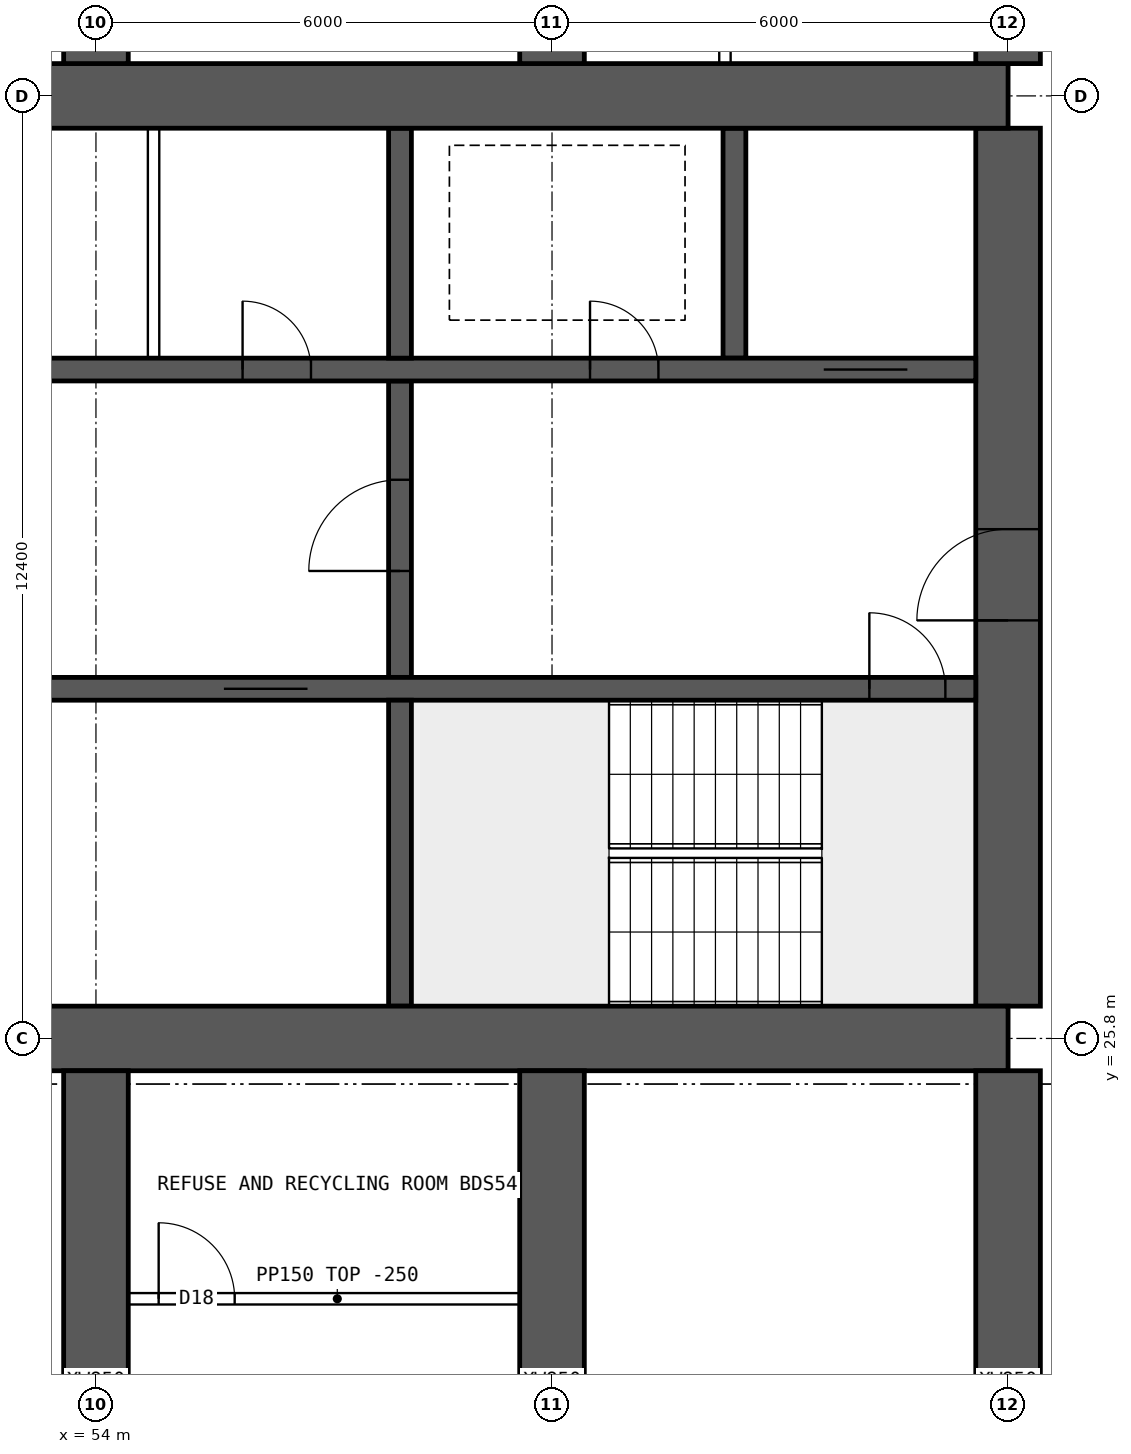
"""IFC4 building model, lengths in metres.
Left out: names, types, materials, properties, quantities, classifications, styles, units other than length and angle.
Written with IfcOpenShell. Run it as: python <this file> out.ifc"""

import sys

from ifc_helpers import new_model, si_unit, direction, frame, frame_2d, origin, place, context, subcontext, project, spatial, rectangle, extrude, element, fill, save


model = new_model("IFC4")
c1 = context("Model", 3, precision=1e-05, world=origin(), true_north=direction((0.0, 1.0)))
c2 = subcontext(c1, "Body", "Model", "MODEL_VIEW")
j1 = project(units=[si_unit("LENGTHUNIT", "METRE"), si_unit("PLANEANGLEUNIT", "RADIAN")], contexts=[c1])
p1 = place(None, origin())
s1 = spatial("IfcSite", under=j1, at=p1, CompositionType="ELEMENT")
p2 = place(p1, origin())
s2 = spatial("IfcBuilding", under=s1, at=p2, CompositionType="ELEMENT")
p3 = place(p2, frame((0.0, 0.0, 167.35)))
s3 = spatial("IfcBuildingStorey", under=s2, at=p3, CompositionType="ELEMENT", Elevation=167.35)
for number, where, z_axis, x_axis in (
    (1, (18.0, 25.8, 0.0), (0.0, 0.0, 1.0), (1.0, 0.0, 0.0)),
    (2, (18.0, 38.2, 0.0), (0.0, 0.0, 1.0), (1.0, 0.0, 0.0)),
):
    element("IfcWall", number, at=place(p3, frame(where, z_axis=z_axis, x_axis=x_axis)), inside=s3, PredefinedType="SHEAR", context=c2, shape_type="SweptSolid", body=[
        extrude(rectangle(XDim=48.0, YDim=0.85, at=frame_2d((24.0, 0.0))), origin(), (0.0, 0.0, 1.0), 3.75),
    ])
p4 = place(p3, frame((66.0, 26.225, 0.0), z_axis=(0.0, 0.0, 1.0), x_axis=(0.0, 1.0, 0.0)))
e3 = element("IfcWall", 3, at=p4, inside=s3, PredefinedType="SHEAR", context=c2, shape_type="SweptSolid", body=[
    extrude(rectangle(XDim=11.55, YDim=0.85, at=frame_2d((5.775, 0.0))), origin(), (0.0, 0.0, 1.0), 3.75),
])
p5 = place(p4, frame((5.075, 0.0, 0.0)))
e4 = element("IfcOpeningElement", 4, at=p5, cuts=e3, PredefinedType="OPENING", context=c2, shape_type="SweptSolid", body=[
    extrude(rectangle(XDim=1.2, YDim=2.1, at=frame_2d((0.6, 1.05))), frame((0.0, 0.435, 0.0), z_axis=(0.0, -1.0, 0.0), x_axis=(1.0, 0.0, 0.0)), (0.0, 0.0, 1.0), 0.87),
])
p6 = place(p3, frame((18.425, 30.4, 0.0), z_axis=(0.0, 0.0, 1.0), x_axis=(1.0, 0.0, 0.0)))
e5 = element("IfcWall", 5, at=p6, inside=s3, PredefinedType="SHEAR", context=c2, shape_type="SweptSolid", body=[
    extrude(rectangle(XDim=47.15, YDim=0.3, at=frame_2d((23.575, 0.0))), origin(), (0.0, 0.0, 1.0), 3.75),
])
p7 = place(p6, frame((0.4, 0.0, 0.0)))
e6 = element("IfcOpeningElement", 6, at=p7, cuts=e5, PredefinedType="OPENING", context=c2, shape_type="SweptSolid", body=[
    extrude(rectangle(XDim=1.0, YDim=2.1, at=frame_2d((0.5, 1.05))), frame((0.0, 0.16, 0.0), z_axis=(0.0, -1.0, 0.0), x_axis=(1.0, 0.0, 0.0)), (0.0, 0.0, 1.0), 0.32),
])
p8 = place(p6, frame((45.75, 0.0, 0.0)))
e7 = element("IfcOpeningElement", 7, at=p8, cuts=e5, PredefinedType="OPENING", context=c2, shape_type="SweptSolid", body=[
    extrude(rectangle(XDim=1.0, YDim=2.1, at=frame_2d((0.5, 1.05))), frame((0.0, 0.16, 0.0), z_axis=(0.0, -1.0, 0.0), x_axis=(1.0, 0.0, 0.0)), (0.0, 0.0, 1.0), 0.32),
])
p9 = place(p6, frame((8.325, 0.0, 0.0)))
e8 = element("IfcOpeningElement", 8, at=p9, cuts=e5, PredefinedType="OPENING", context=c2, shape_type="SweptSolid", body=[
    extrude(rectangle(XDim=1.1, YDim=2.1, at=frame_2d((0.55, 1.05))), frame((0.0, 0.16, 0.0), z_axis=(0.0, -1.0, 0.0), x_axis=(1.0, 0.0, 0.0)), (0.0, 0.0, 1.0), 0.32),
])
p10 = place(p6, frame((10.925, 0.0, 0.0)))
e9 = element("IfcOpeningElement", 9, at=p10, cuts=e5, PredefinedType="OPENING", context=c2, shape_type="SweptSolid", body=[
    extrude(rectangle(XDim=1.1, YDim=2.1, at=frame_2d((0.55, 1.05))), frame((0.0, 0.16, 0.0), z_axis=(0.0, -1.0, 0.0), x_axis=(1.0, 0.0, 0.0)), (0.0, 0.0, 1.0), 0.32),
])
p11 = place(p6, frame((13.525, 0.0, 0.0)))
e10 = element("IfcOpeningElement", 10, at=p11, cuts=e5, PredefinedType="OPENING", context=c2, shape_type="SweptSolid", body=[
    extrude(rectangle(XDim=1.1, YDim=2.1, at=frame_2d((0.55, 1.05))), frame((0.0, 0.16, 0.0), z_axis=(0.0, -1.0, 0.0), x_axis=(1.0, 0.0, 0.0)), (0.0, 0.0, 1.0), 0.32),
])
p12 = place(p6, frame((16.125, 0.0, 0.0)))
e11 = element("IfcOpeningElement", 11, at=p12, cuts=e5, PredefinedType="OPENING", context=c2, shape_type="SweptSolid", body=[
    extrude(rectangle(XDim=1.1, YDim=2.1, at=frame_2d((0.55, 1.05))), frame((0.0, 0.16, 0.0), z_axis=(0.0, -1.0, 0.0), x_axis=(1.0, 0.0, 0.0)), (0.0, 0.0, 1.0), 0.32),
])
p13 = place(p6, frame((18.9, 0.0, 0.0)))
e12 = element("IfcOpeningElement", 12, at=p13, cuts=e5, PredefinedType="OPENING", context=c2, shape_type="SweptSolid", body=[
    extrude(rectangle(XDim=0.9, YDim=2.1, at=frame_2d((0.45, 1.05))), frame((0.0, 0.16, 0.0), z_axis=(0.0, -1.0, 0.0), x_axis=(1.0, 0.0, 0.0)), (0.0, 0.0, 1.0), 0.32),
])
p14 = place(p6, frame((30.192, 0.0, 0.0)))
e13 = element("IfcOpeningElement", 13, at=p14, cuts=e5, PredefinedType="OPENING", context=c2, shape_type="SweptSolid", body=[
    extrude(rectangle(XDim=1.1, YDim=2.1, at=frame_2d((0.55, 1.05))), frame((0.0, 0.16, 0.0), z_axis=(0.0, -1.0, 0.0), x_axis=(1.0, 0.0, 0.0)), (0.0, 0.0, 1.0), 0.32),
])
p15 = place(p6, frame((33.725, 0.0, 0.0)))
e14 = element("IfcOpeningElement", 14, at=p15, cuts=e5, PredefinedType="OPENING", context=c2, shape_type="SweptSolid", body=[
    extrude(rectangle(XDim=1.1, YDim=2.1, at=frame_2d((0.55, 1.05))), frame((0.0, 0.16, 0.0), z_axis=(0.0, -1.0, 0.0), x_axis=(1.0, 0.0, 0.0)), (0.0, 0.0, 1.0), 0.32),
])
p16 = place(p6, frame((37.258, 0.0, 0.0)))
e15 = element("IfcOpeningElement", 15, at=p16, cuts=e5, PredefinedType="OPENING", context=c2, shape_type="SweptSolid", body=[
    extrude(rectangle(XDim=1.1, YDim=2.1, at=frame_2d((0.55, 1.05))), frame((0.0, 0.16, 0.0), z_axis=(0.0, -1.0, 0.0), x_axis=(1.0, 0.0, 0.0)), (0.0, 0.0, 1.0), 0.32),
])
p17 = place(p3, frame((18.425, 34.6, 0.0), z_axis=(0.0, 0.0, 1.0), x_axis=(1.0, 0.0, 0.0)))
e16 = element("IfcWall", 16, at=p17, inside=s3, PredefinedType="SHEAR", context=c2, shape_type="SweptSolid", body=[
    extrude(rectangle(XDim=47.15, YDim=0.3, at=frame_2d((23.575, 0.0))), origin(), (0.0, 0.0, 1.0), 3.75),
])
p18 = place(p17, frame((0.9, 0.0, 0.0)))
e17 = element("IfcOpeningElement", 17, at=p18, cuts=e16, PredefinedType="OPENING", context=c2, shape_type="SweptSolid", body=[
    extrude(rectangle(XDim=1.1, YDim=2.1, at=frame_2d((0.55, 1.05))), frame((0.0, 0.16, 0.0), z_axis=(0.0, -1.0, 0.0), x_axis=(1.0, 0.0, 0.0)), (0.0, 0.0, 1.0), 0.32),
])
p19 = place(p17, frame((45.15, 0.0, 0.0)))
e18 = element("IfcOpeningElement", 18, at=p19, cuts=e16, PredefinedType="OPENING", context=c2, shape_type="SweptSolid", body=[
    extrude(rectangle(XDim=1.1, YDim=2.1, at=frame_2d((0.55, 1.05))), frame((0.0, 0.16, 0.0), z_axis=(0.0, -1.0, 0.0), x_axis=(1.0, 0.0, 0.0)), (0.0, 0.0, 1.0), 0.32),
])
p20 = place(p17, frame((4.175, 0.0, 0.0)))
e19 = element("IfcOpeningElement", 19, at=p20, cuts=e16, PredefinedType="OPENING", context=c2, shape_type="SweptSolid", body=[
    extrude(rectangle(XDim=0.9, YDim=2.1, at=frame_2d((0.45, 1.05))), frame((0.0, 0.16, 0.0), z_axis=(0.0, -1.0, 0.0), x_axis=(1.0, 0.0, 0.0)), (0.0, 0.0, 1.0), 0.32),
])
p21 = place(p17, frame((42.075, 0.0, 0.0)))
e20 = element("IfcOpeningElement", 20, at=p21, cuts=e16, PredefinedType="OPENING", context=c2, shape_type="SweptSolid", body=[
    extrude(rectangle(XDim=0.9, YDim=2.1, at=frame_2d((0.45, 1.05))), frame((0.0, 0.16, 0.0), z_axis=(0.0, -1.0, 0.0), x_axis=(1.0, 0.0, 0.0)), (0.0, 0.0, 1.0), 0.32),
])
p22 = place(p17, frame((8.95, 0.0, 0.0)))
e21 = element("IfcOpeningElement", 21, at=p22, cuts=e16, PredefinedType="OPENING", context=c2, shape_type="SweptSolid", body=[
    extrude(rectangle(XDim=0.9, YDim=2.1, at=frame_2d((0.45, 1.05))), frame((0.0, 0.16, 0.0), z_axis=(0.0, -1.0, 0.0), x_axis=(1.0, 0.0, 0.0)), (0.0, 0.0, 1.0), 0.32),
])
p23 = place(p17, frame((12.924, 0.0, 0.0)))
e22 = element("IfcOpeningElement", 22, at=p23, cuts=e16, PredefinedType="OPENING", context=c2, shape_type="SweptSolid", body=[
    extrude(rectangle(XDim=0.9, YDim=2.1, at=frame_2d((0.45, 1.05))), frame((0.0, 0.16, 0.0), z_axis=(0.0, -1.0, 0.0), x_axis=(1.0, 0.0, 0.0)), (0.0, 0.0, 1.0), 0.32),
])
p24 = place(p17, frame((16.571, 0.0, 0.0)))
e23 = element("IfcOpeningElement", 23, at=p24, cuts=e16, PredefinedType="OPENING", context=c2, shape_type="SweptSolid", body=[
    extrude(rectangle(XDim=0.9, YDim=2.1, at=frame_2d((0.45, 1.05))), frame((0.0, 0.16, 0.0), z_axis=(0.0, -1.0, 0.0), x_axis=(1.0, 0.0, 0.0)), (0.0, 0.0, 1.0), 0.32),
])
p25 = place(p17, frame((20.33, 0.0, 0.0)))
e24 = element("IfcOpeningElement", 24, at=p25, cuts=e16, PredefinedType="OPENING", context=c2, shape_type="SweptSolid", body=[
    extrude(rectangle(XDim=0.9, YDim=2.1, at=frame_2d((0.45, 1.05))), frame((0.0, 0.16, 0.0), z_axis=(0.0, -1.0, 0.0), x_axis=(1.0, 0.0, 0.0)), (0.0, 0.0, 1.0), 0.32),
])
p26 = place(p17, frame((24.736, 0.0, 0.0)))
e25 = element("IfcOpeningElement", 25, at=p26, cuts=e16, PredefinedType="OPENING", context=c2, shape_type="SweptSolid", body=[
    extrude(rectangle(XDim=0.9, YDim=2.1, at=frame_2d((0.45, 1.05))), frame((0.0, 0.16, 0.0), z_axis=(0.0, -1.0, 0.0), x_axis=(1.0, 0.0, 0.0)), (0.0, 0.0, 1.0), 0.32),
])
p27 = place(p17, frame((27.533, 0.0, 0.0)))
e26 = element("IfcOpeningElement", 26, at=p27, cuts=e16, PredefinedType="OPENING", context=c2, shape_type="SweptSolid", body=[
    extrude(rectangle(XDim=0.9, YDim=2.1, at=frame_2d((0.45, 1.05))), frame((0.0, 0.16, 0.0), z_axis=(0.0, -1.0, 0.0), x_axis=(1.0, 0.0, 0.0)), (0.0, 0.0, 1.0), 0.32),
])
p28 = place(p17, frame((29.906, 0.0, 0.0)))
e27 = element("IfcOpeningElement", 27, at=p28, cuts=e16, PredefinedType="OPENING", context=c2, shape_type="SweptSolid", body=[
    extrude(rectangle(XDim=0.9, YDim=2.1, at=frame_2d((0.45, 1.05))), frame((0.0, 0.16, 0.0), z_axis=(0.0, -1.0, 0.0), x_axis=(1.0, 0.0, 0.0)), (0.0, 0.0, 1.0), 0.32),
])
p29 = place(p17, frame((33.756, 0.0, 0.0)))
e28 = element("IfcOpeningElement", 28, at=p29, cuts=e16, PredefinedType="OPENING", context=c2, shape_type="SweptSolid", body=[
    extrude(rectangle(XDim=0.9, YDim=2.1, at=frame_2d((0.45, 1.05))), frame((0.0, 0.16, 0.0), z_axis=(0.0, -1.0, 0.0), x_axis=(1.0, 0.0, 0.0)), (0.0, 0.0, 1.0), 0.32),
])
p30 = place(p17, frame((37.504, 0.0, 0.0)))
e29 = element("IfcOpeningElement", 29, at=p30, cuts=e16, PredefinedType="OPENING", context=c2, shape_type="SweptSolid", body=[
    extrude(rectangle(XDim=0.9, YDim=2.1, at=frame_2d((0.45, 1.05))), frame((0.0, 0.16, 0.0), z_axis=(0.0, -1.0, 0.0), x_axis=(1.0, 0.0, 0.0)), (0.0, 0.0, 1.0), 0.32),
])
p31 = place(p3, frame((58.0, 26.225, 0.0), z_axis=(0.0, 0.0, 1.0), x_axis=(0.0, 1.0, 0.0)))
e30 = element("IfcWall", 30, at=p31, inside=s3, PredefinedType="SHEAR", context=c2, shape_type="SweptSolid", body=[
    extrude(rectangle(XDim=4.025, YDim=0.3, at=frame_2d((2.012, 0.0))), origin(), (0.0, 0.0, 1.0), 3.75),
])
p32 = place(p3, frame((58.0, 30.55, 0.0), z_axis=(0.0, 0.0, 1.0), x_axis=(0.0, 1.0, 0.0)))
e31 = element("IfcWall", 31, at=p32, inside=s3, PredefinedType="SHEAR", context=c2, shape_type="SweptSolid", body=[
    extrude(rectangle(XDim=3.9, YDim=0.3, at=frame_2d((1.95, 0.0))), origin(), (0.0, 0.0, 1.0), 3.75),
])
p33 = place(p32, frame((1.4, 0.0, 0.0)))
e32 = element("IfcOpeningElement", 32, at=p33, cuts=e31, PredefinedType="OPENING", context=c2, shape_type="SweptSolid", body=[
    extrude(rectangle(XDim=1.2, YDim=2.1, at=frame_2d((0.6, 1.05))), frame((0.0, 0.16, 0.0), z_axis=(0.0, -1.0, 0.0), x_axis=(1.0, 0.0, 0.0)), (0.0, 0.0, 1.0), 0.32),
])
for number, where, z_axis, x_axis in (
    (33, (62.4, 34.75, 0.0), (0.0, 0.0, 1.0), (0.0, 1.0, 0.0)),
    (34, (58.0, 34.75, 0.0), (0.0, 0.0, 1.0), (0.0, 1.0, 0.0)),
):
    element("IfcWall", number, at=place(p3, frame(where, z_axis=z_axis, x_axis=x_axis)), inside=s3, PredefinedType="SHEAR", context=c2, shape_type="SweptSolid", body=[
        extrude(rectangle(XDim=3.025, YDim=0.3, at=frame_2d((1.512, 0.0))), origin(), (0.0, 0.0, 1.0), 3.75),
    ])
for number, where, z_axis, x_axis in (
    (35, (54.0, 17.2, 0.0), (0.0, 0.0, 1.0), (0.0, 1.0, 0.0)),
    (36, (54.0, 38.625, 0.0), (0.0, 0.0, 1.0), (0.0, 1.0, 0.0)),
    (37, (60.0, 17.2, 0.0), (0.0, 0.0, 1.0), (0.0, 1.0, 0.0)),
    (38, (60.0, 38.625, 0.0), (0.0, 0.0, 1.0), (0.0, 1.0, 0.0)),
    (39, (66.0, 17.2, 0.0), (0.0, 0.0, 1.0), (0.0, 1.0, 0.0)),
    (40, (66.0, 38.625, 0.0), (0.0, 0.0, 1.0), (0.0, 1.0, 0.0)),
):
    element("IfcWall", number, at=place(p3, frame(where, z_axis=z_axis, x_axis=x_axis)), inside=s3, PredefinedType="SHEAR", context=c2, shape_type="SweptSolid", body=[
        extrude(rectangle(XDim=8.175, YDim=0.85, at=frame_2d((4.087, 0.0))), origin(), (0.0, 0.0, 1.0), 3.75),
    ])
p34 = place(p3, frame((54.758, 34.75, 0.0), z_axis=(0.0, 0.0, 1.0), x_axis=(0.0, 1.0, 0.0)))
e41 = element("IfcWall", 41, at=p34, inside=s3, PredefinedType="SOLIDWALL", context=c2, shape_type="SweptSolid", body=[
    extrude(rectangle(XDim=3.025, YDim=0.15, at=frame_2d((1.512, 0.0))), origin(), (0.0, 0.0, 1.0), 3.5),
])
p35 = place(p3, frame((54.425, 22.375, 0.0), z_axis=(0.0, 0.0, 1.0), x_axis=(1.0, 0.0, 0.0)))
e42 = element("IfcWall", 42, at=p35, inside=s3, PredefinedType="PARTITIONING", context=c2, shape_type="SweptSolid", body=[
    extrude(rectangle(XDim=5.5, YDim=0.15, at=frame_2d((2.75, 0.0))), origin(), (0.0, 0.0, 1.0), 3.5),
])
p36 = place(p35, frame((0.4, 0.0, 0.0)))
e43 = element("IfcOpeningElement", 43, at=p36, cuts=e42, PredefinedType="OPENING", context=c2, shape_type="SweptSolid", body=[
    extrude(rectangle(XDim=1.0, YDim=2.1, at=frame_2d((0.5, 1.05))), frame((0.0, 0.085, 0.0), z_axis=(0.0, -1.0, 0.0), x_axis=(1.0, 0.0, 0.0)), (0.0, 0.0, 1.0), 0.17),
])
p37 = place(p3, frame((62.275, 40.925, 0.0), z_axis=(0.0, 0.0, 1.0), x_axis=(0.0, -1.0, 0.0)))
e44 = element("IfcWall", 44, at=p37, inside=s3, PredefinedType="PARTITIONING", context=c2, shape_type="SweptSolid", body=[
    extrude(rectangle(XDim=2.3, YDim=0.15, at=frame_2d((1.15, 0.0))), origin(), (0.0, 0.0, 1.0), 3.5),
])
p38 = place(p5, origin())
e45 = element("IfcDoor", 45, at=p38, inside=s3, OperationType="SINGLE_SWING_LEFT", PredefinedType="DOOR", context=c2, shape_type="SweptSolid", body=[
    extrude(rectangle(XDim=1.2, YDim=2.1, at=frame_2d((0.6, 1.05))), frame((0.0, 0.025, 0.0), z_axis=(0.0, -1.0, 0.0), x_axis=(1.0, 0.0, 0.0)), (0.0, 0.0, 1.0), 0.05),
])
fill(e4, e45)
p39 = place(p8, origin())
e46 = element("IfcDoor", 46, at=p39, inside=s3, OperationType="SINGLE_SWING_LEFT", PredefinedType="DOOR", context=c2, shape_type="SweptSolid", body=[
    extrude(rectangle(XDim=1.0, YDim=2.1, at=frame_2d((0.5, 1.05))), frame((0.0, 0.025, 0.0), z_axis=(0.0, -1.0, 0.0), x_axis=(1.0, 0.0, 0.0)), (0.0, 0.0, 1.0), 0.05),
])
fill(e7, e46)
p40 = place(p19, origin())
e47 = element("IfcDoor", 47, at=p40, inside=s3, OperationType="DOUBLE_DOOR_SLIDING", PredefinedType="DOOR", context=c2, shape_type="SweptSolid", body=[
    extrude(rectangle(XDim=1.1, YDim=2.1, at=frame_2d((0.55, 1.05))), frame((0.0, 0.025, 0.0), z_axis=(0.0, -1.0, 0.0), x_axis=(1.0, 0.0, 0.0)), (0.0, 0.0, 1.0), 0.05),
])
fill(e18, e47)
p41 = place(p21, origin())
e48 = element("IfcDoor", 48, at=p41, inside=s3, OperationType="SINGLE_SWING_LEFT", PredefinedType="DOOR", context=c2, shape_type="SweptSolid", body=[
    extrude(rectangle(XDim=0.9, YDim=2.1, at=frame_2d((0.45, 1.05))), frame((0.0, 0.025, 0.0), z_axis=(0.0, -1.0, 0.0), x_axis=(1.0, 0.0, 0.0)), (0.0, 0.0, 1.0), 0.05),
])
fill(e20, e48)
p42 = place(p33, origin())
e49 = element("IfcDoor", 49, at=p42, inside=s3, OperationType="SINGLE_SWING_LEFT", PredefinedType="DOOR", context=c2, shape_type="SweptSolid", body=[
    extrude(rectangle(XDim=1.2, YDim=2.1, at=frame_2d((0.6, 1.05))), frame((0.0, 0.025, 0.0), z_axis=(0.0, -1.0, 0.0), x_axis=(1.0, 0.0, 0.0)), (0.0, 0.0, 1.0), 0.05),
])
fill(e32, e49)
p43 = place(p30, origin())
e50 = element("IfcDoor", 50, at=p43, inside=s3, OperationType="SINGLE_SWING_LEFT", PredefinedType="DOOR", context=c2, shape_type="SweptSolid", body=[
    extrude(rectangle(XDim=0.9, YDim=2.1, at=frame_2d((0.45, 1.05))), frame((0.0, 0.025, 0.0), z_axis=(0.0, -1.0, 0.0), x_axis=(1.0, 0.0, 0.0)), (0.0, 0.0, 1.0), 0.05),
])
fill(e29, e50)
p44 = place(p16, origin())
e51 = element("IfcDoor", 51, at=p44, inside=s3, OperationType="DOUBLE_DOOR_SLIDING", PredefinedType="DOOR", context=c2, shape_type="SweptSolid", body=[
    extrude(rectangle(XDim=1.1, YDim=2.1, at=frame_2d((0.55, 1.05))), frame((0.0, 0.025, 0.0), z_axis=(0.0, -1.0, 0.0), x_axis=(1.0, 0.0, 0.0)), (0.0, 0.0, 1.0), 0.05),
])
fill(e15, e51)
p45 = place(p36, origin())
e52 = element("IfcDoor", 52, at=p45, inside=s3, OperationType="SINGLE_SWING_LEFT", PredefinedType="DOOR", context=c2, shape_type="SweptSolid", body=[
    extrude(rectangle(XDim=1.0, YDim=2.1, at=frame_2d((0.5, 1.05))), frame((0.0, 0.025, 0.0), z_axis=(0.0, -1.0, 0.0), x_axis=(1.0, 0.0, 0.0)), (0.0, 0.0, 1.0), 0.05),
])
fill(e43, e52)
save(model, sys.argv[1])
